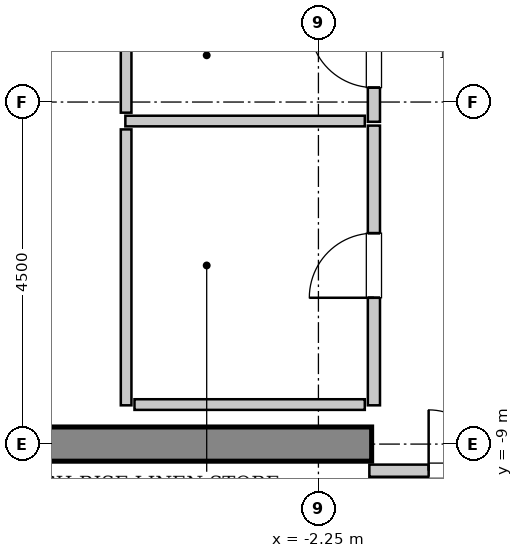
"""IFC4 building model, lengths in metres.
Left out: names, types, materials, properties, quantities, classifications, styles, units other than length and angle.
Written with IfcOpenShell. Run it as: python <this file> out.ifc"""

import sys

from ifc_helpers import new_model, si_unit, direction, frame, frame_2d, origin, place, context, subcontext, project, spatial, rectangle, extrude, source, transform, mapped, element, fill, save


model = new_model("IFC4")
c1 = context("Model", 3, precision=1e-05, world=origin(), true_north=direction((0.0, 1.0)))
c2 = subcontext(c1, "Body", "Model", "MODEL_VIEW")
j1 = project(units=[si_unit("LENGTHUNIT", "METRE"), si_unit("PLANEANGLEUNIT", "RADIAN")], contexts=[c1])
p1 = place(None, origin())
s1 = spatial("IfcSite", under=j1, at=p1, CompositionType="ELEMENT")
p2 = place(p1, origin())
s2 = spatial("IfcBuilding", under=s1, at=p2, CompositionType="ELEMENT")
p3 = place(p2, frame((0.0, 0.0, 298.8)))
s3 = spatial("IfcBuildingStorey", under=s2, at=p3, CompositionType="ELEMENT", Elevation=298.8)
m1 = source(origin(), c2, "Body", "SweptSolid", [
    extrude(rectangle(XDim=9.925, YDim=0.45, at=frame_2d((4.962, 0.0))), origin(), (0.0, 0.0, 1.0), 3.8),
])
p4 = place(p3, frame((-11.475, -9.0, 0.0), z_axis=(0.0, 0.0, 1.0), x_axis=(1.0, 0.0, 0.0)))
e1 = element("IfcWall", 1, at=p4, inside=s3, PredefinedType="SHEAR", context=c2, shape_type="MappedRepresentation", body=[
    mapped(m1, transform((0.0, 0.0, 0.0), x_axis=(1.0, 0.0, 0.0), y_axis=(0.0, 1.0, 0.0), z_axis=(0.0, 0.0, 1.0), scale=1.0)),
])
m2 = source(origin(), c2, "Body", "SweptSolid", [
    extrude(rectangle(XDim=3.16, YDim=0.16, at=frame_2d((1.58, 0.0))), origin(), (0.0, 0.0, 1.0), 2.625),
])
p5 = place(p3, frame((-1.58, -9.35, 0.0), z_axis=(0.0, 0.0, 1.0), x_axis=(1.0, 0.0, 0.0)))
e2 = element("IfcWall", 2, at=p5, inside=s3, PredefinedType="PARTITIONING", context=c2, shape_type="MappedRepresentation", body=[
    mapped(m2, transform((0.0, 0.0, 0.0), x_axis=(1.0, 0.0, 0.0), y_axis=(0.0, 1.0, 0.0), z_axis=(0.0, 0.0, 1.0), scale=1.0)),
])
p6 = place(p5, frame((0.78, 0.0, 0.0)))
e3 = element("IfcOpeningElement", 3, at=p6, cuts=e2, PredefinedType="OPENING", context=c2, shape_type="SweptSolid", body=[
    extrude(rectangle(XDim=1.6, YDim=2.3, at=frame_2d((0.8, 1.15))), frame((0.0, 0.09, 0.0), z_axis=(0.0, -1.0, 0.0), x_axis=(1.0, 0.0, 0.0)), (0.0, 0.0, 1.0), 0.18),
])
m3 = source(origin(), c2, "Body", "SweptSolid", [
    extrude(rectangle(XDim=1.75, YDim=0.16, at=frame_2d((0.875, 0.0))), origin(), (0.0, 0.0, 1.0), 3.535),
])
p7 = place(p3, frame((-1.52, -4.76, 0.0), z_axis=(0.0, 0.0, 1.0), x_axis=(0.0, 1.0, 0.0)))
e4 = element("IfcWall", 4, at=p7, inside=s3, PredefinedType="PARTITIONING", context=c2, shape_type="MappedRepresentation", body=[
    mapped(m3, transform((0.0, 0.0, 0.0), x_axis=(1.0, 0.0, 0.0), y_axis=(0.0, 1.0, 0.0), z_axis=(0.0, 0.0, 1.0), scale=1.0)),
])
p8 = place(p7, frame((0.45, 0.0, 0.0)))
e5 = element("IfcOpeningElement", 5, at=p8, cuts=e4, PredefinedType="OPENING", context=c2, shape_type="SweptSolid", body=[
    extrude(rectangle(XDim=0.85, YDim=2.1, at=frame_2d((0.425, 1.05))), frame((0.0, 0.09, 0.0), z_axis=(0.0, -1.0, 0.0), x_axis=(1.0, 0.0, 0.0)), (0.0, 0.0, 1.0), 0.18),
])
m4 = source(origin(), c2, "Body", "SweptSolid", [
    extrude(rectangle(XDim=3.15, YDim=0.14, at=frame_2d((1.575, 0.0))), origin(), (0.0, 0.0, 1.0), 3.535),
])
p9 = place(p3, frame((-4.79, -4.75, 0.0), z_axis=(0.0, 0.0, 1.0), x_axis=(1.0, 0.0, 0.0)))
e6 = element("IfcWall", 6, at=p9, inside=s3, PredefinedType="PARTITIONING", context=c2, shape_type="MappedRepresentation", body=[
    mapped(m4, transform((0.0, 0.0, 0.0), x_axis=(1.0, 0.0, 0.0), y_axis=(0.0, 1.0, 0.0), z_axis=(0.0, 0.0, 1.0), scale=1.0)),
])
m5 = source(origin(), c2, "Body", "SweptSolid", [
    extrude(rectangle(XDim=1.6, YDim=0.14, at=frame_2d((0.8, 0.0))), origin(), (0.0, 0.0, 1.0), 3.535),
])
p10 = place(p3, frame((-4.78, -4.64, 0.0), z_axis=(0.0, 0.0, 1.0), x_axis=(0.0, 1.0, 0.0)))
e7 = element("IfcWall", 7, at=p10, inside=s3, PredefinedType="PARTITIONING", context=c2, shape_type="MappedRepresentation", body=[
    mapped(m5, transform((0.0, 0.0, 0.0), x_axis=(1.0, 0.0, 0.0), y_axis=(0.0, 1.0, 0.0), z_axis=(0.0, 0.0, 1.0), scale=1.0)),
])
m6 = source(origin(), c2, "Body", "SweptSolid", [
    extrude(rectangle(XDim=3.68, YDim=0.16, at=frame_2d((1.84, 0.0))), origin(), (0.0, 0.0, 1.0), 3.535),
])
p11 = place(p3, frame((-1.52, -8.49, 0.0), z_axis=(0.0, 0.0, 1.0), x_axis=(0.0, 1.0, 0.0)))
e8 = element("IfcWall", 8, at=p11, inside=s3, PredefinedType="PARTITIONING", context=c2, shape_type="MappedRepresentation", body=[
    mapped(m6, transform((0.0, 0.0, 0.0), x_axis=(1.0, 0.0, 0.0), y_axis=(0.0, 1.0, 0.0), z_axis=(0.0, 0.0, 1.0), scale=1.0)),
])
p12 = place(p11, frame((1.415, 0.0, 0.0)))
e9 = element("IfcOpeningElement", 9, at=p12, cuts=e8, PredefinedType="OPENING", context=c2, shape_type="SweptSolid", body=[
    extrude(rectangle(XDim=0.85, YDim=2.1, at=frame_2d((0.425, 1.05))), frame((0.0, 0.09, 0.0), z_axis=(0.0, -1.0, 0.0), x_axis=(1.0, 0.0, 0.0)), (0.0, 0.0, 1.0), 0.18),
])
m7 = source(origin(), c2, "Body", "SweptSolid", [
    extrude(rectangle(XDim=3.63, YDim=0.14, at=frame_2d((1.815, 0.0))), origin(), (0.0, 0.0, 1.0), 3.535),
])
p13 = place(p3, frame((-4.78, -8.49, 0.0), z_axis=(0.0, 0.0, 1.0), x_axis=(0.0, 1.0, 0.0)))
e10 = element("IfcWall", 10, at=p13, inside=s3, PredefinedType="PARTITIONING", context=c2, shape_type="MappedRepresentation", body=[
    mapped(m7, transform((0.0, 0.0, 0.0), x_axis=(1.0, 0.0, 0.0), y_axis=(0.0, 1.0, 0.0), z_axis=(0.0, 0.0, 1.0), scale=1.0)),
])
m8 = source(origin(), c2, "Body", "SweptSolid", [
    extrude(rectangle(XDim=3.03, YDim=0.14, at=frame_2d((1.515, 0.0))), origin(), (0.0, 0.0, 1.0), 3.535),
])
p14 = place(p3, frame((-4.67, -8.48, 0.0), z_axis=(0.0, 0.0, 1.0), x_axis=(1.0, 0.0, 0.0)))
e11 = element("IfcWall", 11, at=p14, inside=s3, PredefinedType="PARTITIONING", context=c2, shape_type="MappedRepresentation", body=[
    mapped(m8, transform((0.0, 0.0, 0.0), x_axis=(1.0, 0.0, 0.0), y_axis=(0.0, 1.0, 0.0), z_axis=(0.0, 0.0, 1.0), scale=1.0)),
])
m9 = source(origin(), c2, "Body", "SweptSolid", [
    extrude(rectangle(XDim=1.6, YDim=2.3, at=frame_2d((0.8, 1.15))), frame((0.0, 0.025, 0.0), z_axis=(0.0, -1.0, 0.0), x_axis=(1.0, 0.0, 0.0)), (0.0, 0.0, 1.0), 0.05),
])
p15 = place(p6, origin())
e12 = element("IfcDoor", 12, at=p15, inside=s3, OperationType="DOUBLE_DOOR_SINGLE_SWING", PredefinedType="DOOR", context=c2, shape_type="MappedRepresentation", body=[
    mapped(m9, transform((0.0, 0.0, 0.0), x_axis=(1.0, 0.0, 0.0), y_axis=(0.0, 1.0, 0.0), z_axis=(0.0, 0.0, 1.0), scale=1.0)),
])
fill(e3, e12)
m10 = source(origin(), c2, "Body", "SweptSolid", [
    extrude(rectangle(XDim=0.85, YDim=2.1, at=frame_2d((0.425, 1.05))), frame((0.0, 0.025, 0.0), z_axis=(0.0, -1.0, 0.0), x_axis=(1.0, 0.0, 0.0)), (0.0, 0.0, 1.0), 0.05),
])
p16 = place(p8, origin())
e13 = element("IfcDoor", 13, at=p16, inside=s3, OperationType="SINGLE_SWING_RIGHT", PredefinedType="DOOR", context=c2, shape_type="MappedRepresentation", body=[
    mapped(m10, transform((0.0, 0.0, 0.0), x_axis=(1.0, 0.0, 0.0), y_axis=(0.0, 1.0, 0.0), z_axis=(0.0, 0.0, 1.0), scale=1.0)),
])
fill(e5, e13)
p17 = place(p12, origin())
e14 = element("IfcDoor", 14, at=p17, inside=s3, OperationType="SINGLE_SWING_LEFT", PredefinedType="DOOR", context=c2, shape_type="MappedRepresentation", body=[
    mapped(m10, transform((0.0, 0.0, 0.0), x_axis=(1.0, 0.0, 0.0), y_axis=(0.0, 1.0, 0.0), z_axis=(0.0, 0.0, 1.0), scale=1.0)),
])
fill(e9, e14)
save(model, sys.argv[1])
